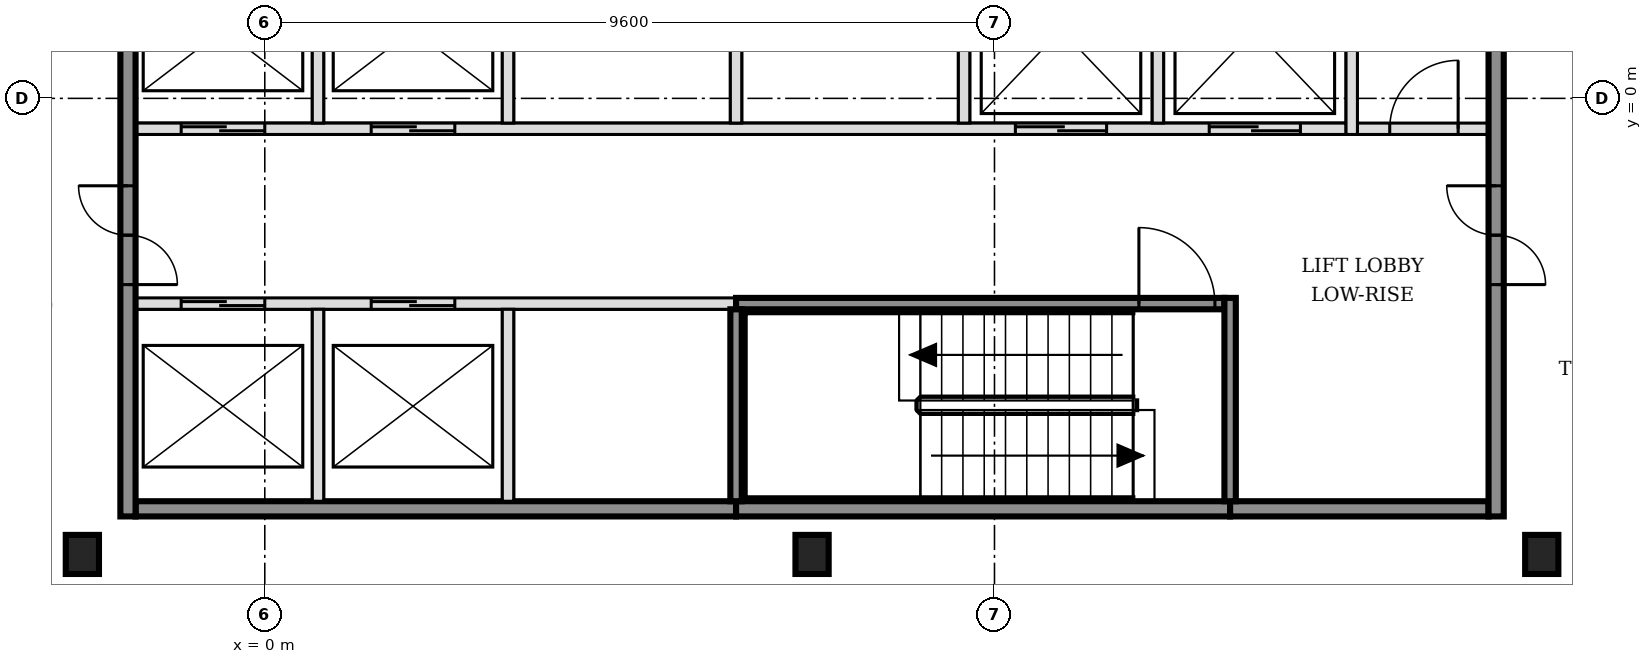
"""IFC4 building model, lengths in metres.
Left out: names, types, materials, properties, quantities, classifications, styles, units other than length and angle.
Written with IfcOpenShell. Run it as: python <this file> out.ifc"""

import sys

from ifc_helpers import new_model, si_unit, direction, frame, frame_2d, origin, origin_2d, place, context, subcontext, project, spatial, rectangle, i_section, extrude, element, fill, save


model = new_model("IFC4")
c1 = context("Model", 3, precision=1e-05, world=origin(), true_north=direction((0.0, 1.0)))
c2 = subcontext(c1, "Body", "Model", "MODEL_VIEW")
j1 = project(units=[si_unit("LENGTHUNIT", "METRE"), si_unit("PLANEANGLEUNIT", "RADIAN")], contexts=[c1])
p1 = place(None, origin())
s1 = spatial("IfcSite", under=j1, at=p1, CompositionType="ELEMENT")
p2 = place(p1, origin())
s2 = spatial("IfcBuilding", under=s1, at=p2, CompositionType="ELEMENT")
p3 = place(p2, frame((0.0, 0.0, 97.8)))
s3 = spatial("IfcBuildingStorey", under=s2, at=p3, CompositionType="ELEMENT", Elevation=97.8)
for number, where, z_axis, x_axis in (
    (1, (-2.4, -6.0, -0.15), (0.0, 0.0, 1.0), (1.0, 0.0, 0.0)),
    (2, (7.2, -6.0, -0.15), (0.0, 0.0, 1.0), (1.0, 0.0, 0.0)),
    (3, (16.8, -6.0, -0.15), (0.0, 0.0, 1.0), (1.0, 0.0, 0.0)),
):
    element("IfcColumn", number, at=place(p3, frame(where, z_axis=z_axis, x_axis=x_axis)), inside=s3, PredefinedType="COLUMN", context=c2, shape_type="SweptSolid", body=[
        extrude(i_section(OverallWidth=0.437, OverallDepth=0.514, WebThickness=0.061, FlangeThickness=0.097, FilletRadius=0.015, at=origin_2d()), origin(), (0.0, 0.0, 1.0), 3.6),
    ])
p4 = place(p3, frame((-1.7, -5.4, 0.0), z_axis=(0.0, 0.0, 1.0), x_axis=(1.0, 0.0, 0.0)))
e4 = element("IfcWall", 4, at=p4, inside=s3, PredefinedType="SOLIDWALL", context=c2, shape_type="SweptSolid", body=[
    extrude(rectangle(XDim=7.9, YDim=0.2, at=frame_2d((3.95, 0.0))), origin(), (0.0, 0.0, 1.0), 3.45),
])
p5 = place(p3, frame((6.2, -5.4, 0.0), z_axis=(0.0, 0.0, 1.0), x_axis=(1.0, 0.0, 0.0)))
e5 = element("IfcWall", 5, at=p5, inside=s3, PredefinedType="SOLIDWALL", context=c2, shape_type="SweptSolid", body=[
    extrude(rectangle(XDim=6.5, YDim=0.2, at=frame_2d((3.25, 0.0))), origin(), (0.0, 0.0, 1.0), 3.45),
])
p6 = place(p3, frame((12.7, -5.4, 0.0), z_axis=(0.0, 0.0, 1.0), x_axis=(1.0, 0.0, 0.0)))
e6 = element("IfcWall", 6, at=p6, inside=s3, PredefinedType="SOLIDWALL", context=c2, shape_type="SweptSolid", body=[
    extrude(rectangle(XDim=3.4, YDim=0.2, at=frame_2d((1.7, 0.0))), origin(), (0.0, 0.0, 1.0), 3.45),
])
p7 = place(p3, frame((-1.7, -2.7, 0.0), z_axis=(0.0, 0.0, 1.0), x_axis=(1.0, 0.0, 0.0)))
e7 = element("IfcWall", 7, at=p7, inside=s3, PredefinedType="SOLIDWALL", context=c2, shape_type="SweptSolid", body=[
    extrude(rectangle(XDim=7.9, YDim=0.15, at=frame_2d((3.95, 0.0))), origin(), (0.0, 0.0, 1.0), 3.45),
])
p8 = place(p7, frame((0.6, 0.0, 0.0)))
e8 = element("IfcOpeningElement", 8, at=p8, cuts=e7, PredefinedType="OPENING", context=c2, shape_type="SweptSolid", body=[
    extrude(rectangle(XDim=1.1, YDim=2.1, at=frame_2d((0.55, 1.05))), frame((0.0, 0.085, 0.0), z_axis=(0.0, -1.0, 0.0), x_axis=(1.0, 0.0, 0.0)), (0.0, 0.0, 1.0), 0.17),
])
p9 = place(p7, frame((3.1, 0.0, 0.0)))
e9 = element("IfcOpeningElement", 9, at=p9, cuts=e7, PredefinedType="OPENING", context=c2, shape_type="SweptSolid", body=[
    extrude(rectangle(XDim=1.1, YDim=2.1, at=frame_2d((0.55, 1.05))), frame((0.0, 0.085, 0.0), z_axis=(0.0, -1.0, 0.0), x_axis=(1.0, 0.0, 0.0)), (0.0, 0.0, 1.0), 0.17),
])
p10 = place(p3, frame((6.2, -2.7, 0.0), z_axis=(0.0, 0.0, 1.0), x_axis=(1.0, 0.0, 0.0)))
e10 = element("IfcWall", 10, at=p10, inside=s3, PredefinedType="SOLIDWALL", context=c2, shape_type="SweptSolid", body=[
    extrude(rectangle(XDim=6.425, YDim=0.15, at=frame_2d((3.212, 0.0))), origin(), (0.0, 0.0, 1.0), 3.45),
])
p11 = place(p10, frame((5.3, 0.0, 0.0)))
e11 = element("IfcOpeningElement", 11, at=p11, cuts=e10, PredefinedType="OPENING", context=c2, shape_type="SweptSolid", body=[
    extrude(rectangle(XDim=1.0, YDim=2.1, at=frame_2d((0.5, 1.05))), frame((0.0, 0.085, 0.0), z_axis=(0.0, -1.0, 0.0), x_axis=(1.0, 0.0, 0.0)), (0.0, 0.0, 1.0), 0.17),
])
p12 = place(p3, frame((-1.7, -0.4, 0.0), z_axis=(0.0, 0.0, 1.0), x_axis=(1.0, 0.0, 0.0)))
e12 = element("IfcWall", 12, at=p12, inside=s3, PredefinedType="SOLIDWALL", context=c2, shape_type="SweptSolid", body=[
    extrude(rectangle(XDim=15.925, YDim=0.15, at=frame_2d((7.962, 0.0))), origin(), (0.0, 0.0, 1.0), 3.45),
])
p13 = place(p12, frame((0.6, 0.0, 0.0)))
e13 = element("IfcOpeningElement", 13, at=p13, cuts=e12, PredefinedType="OPENING", context=c2, shape_type="SweptSolid", body=[
    extrude(rectangle(XDim=1.1, YDim=2.1, at=frame_2d((0.55, 1.05))), frame((0.0, 0.085, 0.0), z_axis=(0.0, -1.0, 0.0), x_axis=(1.0, 0.0, 0.0)), (0.0, 0.0, 1.0), 0.17),
])
p14 = place(p12, frame((3.1, 0.0, 0.0)))
e14 = element("IfcOpeningElement", 14, at=p14, cuts=e12, PredefinedType="OPENING", context=c2, shape_type="SweptSolid", body=[
    extrude(rectangle(XDim=1.1, YDim=2.1, at=frame_2d((0.55, 1.05))), frame((0.0, 0.085, 0.0), z_axis=(0.0, -1.0, 0.0), x_axis=(1.0, 0.0, 0.0)), (0.0, 0.0, 1.0), 0.17),
])
p15 = place(p12, frame((11.575, 0.0, 0.0)))
e15 = element("IfcOpeningElement", 15, at=p15, cuts=e12, PredefinedType="OPENING", context=c2, shape_type="SweptSolid", body=[
    extrude(rectangle(XDim=1.2, YDim=2.1, at=frame_2d((0.6, 1.05))), frame((0.0, 0.085, 0.0), z_axis=(0.0, -1.0, 0.0), x_axis=(1.0, 0.0, 0.0)), (0.0, 0.0, 1.0), 0.17),
])
p16 = place(p12, frame((14.125, 0.0, 0.0)))
e16 = element("IfcOpeningElement", 16, at=p16, cuts=e12, PredefinedType="OPENING", context=c2, shape_type="SweptSolid", body=[
    extrude(rectangle(XDim=1.2, YDim=2.1, at=frame_2d((0.6, 1.05))), frame((0.0, 0.085, 0.0), z_axis=(0.0, -1.0, 0.0), x_axis=(1.0, 0.0, 0.0)), (0.0, 0.0, 1.0), 0.17),
])
p17 = place(p3, frame((14.375, -0.4, 0.0), z_axis=(0.0, 0.0, 1.0), x_axis=(1.0, 0.0, 0.0)))
e17 = element("IfcWall", 17, at=p17, inside=s3, PredefinedType="PARTITIONING", context=c2, shape_type="SweptSolid", body=[
    extrude(rectangle(XDim=1.725, YDim=0.15, at=frame_2d((0.863, 0.0))), origin(), (0.0, 0.0, 1.0), 3.45),
])
p18 = place(p17, frame((0.425, 0.0, 0.0)))
e18 = element("IfcOpeningElement", 18, at=p18, cuts=e17, PredefinedType="OPENING", context=c2, shape_type="SweptSolid", body=[
    extrude(rectangle(XDim=0.9, YDim=2.1, at=frame_2d((0.45, 1.05))), frame((0.0, 0.085, 0.0), z_axis=(0.0, -1.0, 0.0), x_axis=(1.0, 0.0, 0.0)), (0.0, 0.0, 1.0), 0.17),
])
p19 = place(p3, frame((-1.8, -5.5, 0.0), z_axis=(0.0, 0.0, 1.0), x_axis=(0.0, 1.0, 0.0)))
e19 = element("IfcWall", 19, at=p19, inside=s3, PredefinedType="SOLIDWALL", context=c2, shape_type="SweptSolid", body=[
    extrude(rectangle(XDim=15.8, YDim=0.2, at=frame_2d((7.9, 0.0))), origin(), (0.0, 0.0, 1.0), 3.45),
])
p20 = place(p19, frame((3.05, 0.0, 0.0)))
e20 = element("IfcOpeningElement", 20, at=p20, cuts=e19, PredefinedType="OPENING", context=c2, shape_type="SweptSolid", body=[
    extrude(rectangle(XDim=1.3, YDim=2.1, at=frame_2d((0.65, 1.05))), frame((0.0, 0.11, 0.0), z_axis=(0.0, -1.0, 0.0), x_axis=(1.0, 0.0, 0.0)), (0.0, 0.0, 1.0), 0.22),
])
p21 = place(p19, frame((11.45, 0.0, 0.0)))
e21 = element("IfcOpeningElement", 21, at=p21, cuts=e19, PredefinedType="OPENING", context=c2, shape_type="SweptSolid", body=[
    extrude(rectangle(XDim=1.3, YDim=2.1, at=frame_2d((0.65, 1.05))), frame((0.0, 0.11, 0.0), z_axis=(0.0, -1.0, 0.0), x_axis=(1.0, 0.0, 0.0)), (0.0, 0.0, 1.0), 0.22),
])
p22 = place(p3, frame((0.7, -5.3, 0.0), z_axis=(0.0, 0.0, 1.0), x_axis=(0.0, 1.0, 0.0)))
e22 = element("IfcWall", 22, at=p22, inside=s3, PredefinedType="SOLIDWALL", context=c2, shape_type="SweptSolid", body=[
    extrude(rectangle(XDim=2.525, YDim=0.15, at=frame_2d((1.263, 0.0))), origin(), (0.0, 0.0, 1.0), 3.45),
])
p23 = place(p3, frame((0.7, -0.325, 0.0), z_axis=(0.0, 0.0, 1.0), x_axis=(0.0, 1.0, 0.0)))
e23 = element("IfcWall", 23, at=p23, inside=s3, PredefinedType="SOLIDWALL", context=c2, shape_type="SweptSolid", body=[
    extrude(rectangle(XDim=2.45, YDim=0.15, at=frame_2d((1.225, 0.0))), origin(), (0.0, 0.0, 1.0), 3.45),
])
p24 = place(p3, frame((3.2, -5.3, 0.0), z_axis=(0.0, 0.0, 1.0), x_axis=(0.0, 1.0, 0.0)))
e24 = element("IfcWall", 24, at=p24, inside=s3, PredefinedType="SOLIDWALL", context=c2, shape_type="SweptSolid", body=[
    extrude(rectangle(XDim=2.525, YDim=0.15, at=frame_2d((1.263, 0.0))), origin(), (0.0, 0.0, 1.0), 3.45),
])
p25 = place(p3, frame((3.2, -0.325, 0.0), z_axis=(0.0, 0.0, 1.0), x_axis=(0.0, 1.0, 0.0)))
e25 = element("IfcWall", 25, at=p25, inside=s3, PredefinedType="SOLIDWALL", context=c2, shape_type="SweptSolid", body=[
    extrude(rectangle(XDim=2.45, YDim=0.15, at=frame_2d((1.225, 0.0))), origin(), (0.0, 0.0, 1.0), 3.45),
])
p26 = place(p3, frame((6.2, -5.3, 0.0), z_axis=(0.0, 0.0, 1.0), x_axis=(0.0, 1.0, 0.0)))
e26 = element("IfcWall", 26, at=p26, inside=s3, PredefinedType="SOLIDWALL", context=c2, shape_type="SweptSolid", body=[
    extrude(rectangle(XDim=2.525, YDim=0.15, at=frame_2d((1.263, 0.0))), origin(), (0.0, 0.0, 1.0), 3.45),
])
for number, where, z_axis, x_axis in (
    (27, (6.2, -0.325, 0.0), (0.0, 0.0, 1.0), (0.0, 1.0, 0.0)),
    (28, (9.2, -0.325, 0.0), (0.0, 0.0, 1.0), (0.0, 1.0, 0.0)),
    (29, (11.75, -0.325, 0.0), (0.0, 0.0, 1.0), (0.0, 1.0, 0.0)),
):
    element("IfcWall", number, at=place(p3, frame(where, z_axis=z_axis, x_axis=x_axis)), inside=s3, PredefinedType="SOLIDWALL", context=c2, shape_type="SweptSolid", body=[
        extrude(rectangle(XDim=2.45, YDim=0.15, at=frame_2d((1.225, 0.0))), origin(), (0.0, 0.0, 1.0), 3.45),
    ])
p27 = place(p3, frame((12.7, -5.3, 0.0), z_axis=(0.0, 0.0, 1.0), x_axis=(0.0, 1.0, 0.0)))
e30 = element("IfcWall", 30, at=p27, inside=s3, PredefinedType="SOLIDWALL", context=c2, shape_type="SweptSolid", body=[
    extrude(rectangle(XDim=2.675, YDim=0.15, at=frame_2d((1.337, 0.0))), origin(), (0.0, 0.0, 1.0), 3.45),
])
p28 = place(p3, frame((14.3, -0.475, 0.0), z_axis=(0.0, 0.0, 1.0), x_axis=(0.0, 1.0, 0.0)))
e31 = element("IfcWall", 31, at=p28, inside=s3, PredefinedType="SOLIDWALL", context=c2, shape_type="SweptSolid", body=[
    extrude(rectangle(XDim=2.75, YDim=0.15, at=frame_2d((1.375, 0.0))), origin(), (0.0, 0.0, 1.0), 3.45),
])
p29 = place(p3, frame((16.2, -5.5, 0.0), z_axis=(0.0, 0.0, 1.0), x_axis=(0.0, 1.0, 0.0)))
e32 = element("IfcWall", 32, at=p29, inside=s3, PredefinedType="SOLIDWALL", context=c2, shape_type="SweptSolid", body=[
    extrude(rectangle(XDim=15.8, YDim=0.2, at=frame_2d((7.9, 0.0))), origin(), (0.0, 0.0, 1.0), 3.45),
])
p30 = place(p29, frame((3.05, 0.0, 0.0)))
e33 = element("IfcOpeningElement", 33, at=p30, cuts=e32, PredefinedType="OPENING", context=c2, shape_type="SweptSolid", body=[
    extrude(rectangle(XDim=1.3, YDim=2.1, at=frame_2d((0.65, 1.05))), frame((0.0, 0.11, 0.0), z_axis=(0.0, -1.0, 0.0), x_axis=(1.0, 0.0, 0.0)), (0.0, 0.0, 1.0), 0.22),
])
p31 = place(p29, frame((11.45, 0.0, 0.0)))
e34 = element("IfcOpeningElement", 34, at=p31, cuts=e32, PredefinedType="OPENING", context=c2, shape_type="SweptSolid", body=[
    extrude(rectangle(XDim=1.3, YDim=2.1, at=frame_2d((0.65, 1.05))), frame((0.0, 0.11, 0.0), z_axis=(0.0, -1.0, 0.0), x_axis=(1.0, 0.0, 0.0)), (0.0, 0.0, 1.0), 0.22),
])
p32 = place(p8, origin())
e35 = element("IfcDoor", 35, at=p32, inside=s3, OperationType="DOUBLE_DOOR_SLIDING", PredefinedType="DOOR", context=c2, shape_type="SweptSolid", body=[
    extrude(rectangle(XDim=1.1, YDim=2.1, at=frame_2d((0.55, 1.05))), frame((0.0, 0.025, 0.0), z_axis=(0.0, -1.0, 0.0), x_axis=(1.0, 0.0, 0.0)), (0.0, 0.0, 1.0), 0.05),
])
fill(e8, e35)
p33 = place(p9, origin())
e36 = element("IfcDoor", 36, at=p33, inside=s3, OperationType="DOUBLE_DOOR_SLIDING", PredefinedType="DOOR", context=c2, shape_type="SweptSolid", body=[
    extrude(rectangle(XDim=1.1, YDim=2.1, at=frame_2d((0.55, 1.05))), frame((0.0, 0.025, 0.0), z_axis=(0.0, -1.0, 0.0), x_axis=(1.0, 0.0, 0.0)), (0.0, 0.0, 1.0), 0.05),
])
fill(e9, e36)
p34 = place(p13, origin())
e37 = element("IfcDoor", 37, at=p34, inside=s3, OperationType="DOUBLE_DOOR_SLIDING", PredefinedType="DOOR", context=c2, shape_type="SweptSolid", body=[
    extrude(rectangle(XDim=1.1, YDim=2.1, at=frame_2d((0.55, 1.05))), frame((0.0, 0.025, 0.0), z_axis=(0.0, -1.0, 0.0), x_axis=(1.0, 0.0, 0.0)), (0.0, 0.0, 1.0), 0.05),
])
fill(e13, e37)
p35 = place(p14, origin())
e38 = element("IfcDoor", 38, at=p35, inside=s3, OperationType="DOUBLE_DOOR_SLIDING", PredefinedType="DOOR", context=c2, shape_type="SweptSolid", body=[
    extrude(rectangle(XDim=1.1, YDim=2.1, at=frame_2d((0.55, 1.05))), frame((0.0, 0.025, 0.0), z_axis=(0.0, -1.0, 0.0), x_axis=(1.0, 0.0, 0.0)), (0.0, 0.0, 1.0), 0.05),
])
fill(e14, e38)
p36 = place(p15, origin())
e39 = element("IfcDoor", 39, at=p36, inside=s3, OperationType="DOUBLE_DOOR_SLIDING", PredefinedType="DOOR", context=c2, shape_type="SweptSolid", body=[
    extrude(rectangle(XDim=1.2, YDim=2.1, at=frame_2d((0.6, 1.05))), frame((0.0, 0.025, 0.0), z_axis=(0.0, -1.0, 0.0), x_axis=(1.0, 0.0, 0.0)), (0.0, 0.0, 1.0), 0.05),
])
fill(e15, e39)
p37 = place(p16, origin())
e40 = element("IfcDoor", 40, at=p37, inside=s3, OperationType="DOUBLE_DOOR_SLIDING", PredefinedType="DOOR", context=c2, shape_type="SweptSolid", body=[
    extrude(rectangle(XDim=1.2, YDim=2.1, at=frame_2d((0.6, 1.05))), frame((0.0, 0.025, 0.0), z_axis=(0.0, -1.0, 0.0), x_axis=(1.0, 0.0, 0.0)), (0.0, 0.0, 1.0), 0.05),
])
fill(e16, e40)
p38 = place(p11, origin())
e41 = element("IfcDoor", 41, at=p38, inside=s3, OperationType="SINGLE_SWING_LEFT", PredefinedType="DOOR", context=c2, shape_type="SweptSolid", body=[
    extrude(rectangle(XDim=1.0, YDim=2.1, at=frame_2d((0.5, 1.05))), frame((0.0, 0.025, 0.0), z_axis=(0.0, -1.0, 0.0), x_axis=(1.0, 0.0, 0.0)), (0.0, 0.0, 1.0), 0.05),
])
fill(e11, e41)
p39 = place(p20, origin())
e42 = element("IfcDoor", 42, at=p39, inside=s3, OperationType="DOUBLE_DOOR_SINGLE_SWING", PredefinedType="DOOR", context=c2, shape_type="SweptSolid", body=[
    extrude(rectangle(XDim=1.3, YDim=2.1, at=frame_2d((0.65, 1.05))), frame((0.0, 0.025, 0.0), z_axis=(0.0, -1.0, 0.0), x_axis=(1.0, 0.0, 0.0)), (0.0, 0.0, 1.0), 0.05),
])
fill(e20, e42)
p40 = place(p30, origin())
e43 = element("IfcDoor", 43, at=p40, inside=s3, OperationType="DOUBLE_DOOR_SINGLE_SWING", PredefinedType="DOOR", context=c2, shape_type="SweptSolid", body=[
    extrude(rectangle(XDim=1.3, YDim=2.1, at=frame_2d((0.65, 1.05))), frame((0.0, 0.025, 0.0), z_axis=(0.0, -1.0, 0.0), x_axis=(1.0, 0.0, 0.0)), (0.0, 0.0, 1.0), 0.05),
])
fill(e33, e43)
p41 = place(p18, origin())
e44 = element("IfcDoor", 44, at=p41, inside=s3, OperationType="SINGLE_SWING_RIGHT", PredefinedType="DOOR", context=c2, shape_type="SweptSolid", body=[
    extrude(rectangle(XDim=0.9, YDim=2.1, at=frame_2d((0.45, 1.05))), frame((0.0, 0.025, 0.0), z_axis=(0.0, -1.0, 0.0), x_axis=(1.0, 0.0, 0.0)), (0.0, 0.0, 1.0), 0.05),
])
fill(e18, e44)
save(model, sys.argv[1])
